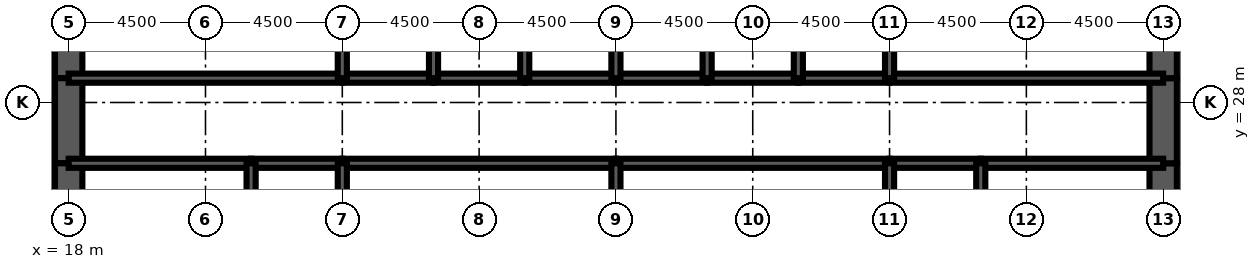
"""IFC4 building model, lengths in metres.
Left out: names, types, materials, properties, quantities, classifications, styles, units other than length and angle.
Written with IfcOpenShell. Run it as: python <this file> out.ifc"""

import sys

from ifc_helpers import new_model, si_unit, direction, frame, frame_2d, origin, place, context, subcontext, project, spatial, rectangle, extrude, element, fill, save


model = new_model("IFC4")
c1 = context("Model", 3, precision=1e-05, world=origin(), true_north=direction((0.0, 1.0)))
c2 = subcontext(c1, "Body", "Model", "MODEL_VIEW")
j1 = project(units=[si_unit("LENGTHUNIT", "METRE"), si_unit("PLANEANGLEUNIT", "RADIAN")], contexts=[c1])
p1 = place(None, origin())
s1 = spatial("IfcSite", under=j1, at=p1, CompositionType="ELEMENT")
p2 = place(p1, origin())
s2 = spatial("IfcBuilding", under=s1, at=p2, CompositionType="ELEMENT")
p3 = place(p2, frame((0.0, 0.0, 77.0)))
s3 = spatial("IfcBuildingStorey", under=s2, at=p3, CompositionType="ELEMENT", Elevation=77.0)
p4 = place(p3, frame((18.0, 32.0, 0.0), z_axis=(0.0, 0.0, 1.0), x_axis=(0.0, -1.0, 0.0)))
e1 = element("IfcWall", 1, at=p4, inside=s3, PredefinedType="SHEAR", context=c2, shape_type="SweptSolid", body=[
    extrude(rectangle(XDim=3.2, YDim=0.9, at=frame_2d((1.6, 0.0))), origin(), (0.0, 0.0, 1.0), 4.5),
])
p5 = place(p3, frame((18.0, 28.8, 0.0), z_axis=(0.0, 0.0, 1.0), x_axis=(0.0, -1.0, 0.0)))
e2 = element("IfcWall", 2, at=p5, inside=s3, PredefinedType="SHEAR", context=c2, shape_type="SweptSolid", body=[
    extrude(rectangle(XDim=2.8, YDim=0.9, at=frame_2d((1.4, 0.0))), origin(), (0.0, 0.0, 1.0), 4.5),
])
p6 = place(p5, frame((0.4, 0.0, 0.0)))
e3 = element("IfcOpeningElement", 3, at=p6, cuts=e2, PredefinedType="OPENING", context=c2, shape_type="SweptSolid", body=[
    extrude(rectangle(XDim=1.8, YDim=2.1, at=frame_2d((0.9, 1.05))), frame((0.0, 0.46, 0.0), z_axis=(0.0, -1.0, 0.0), x_axis=(1.0, 0.0, 0.0)), (0.0, 0.0, 1.0), 0.92),
])
for number, where, z_axis, x_axis in (
    (4, (18.0, 26.0, 0.0), (0.0, 0.0, 1.0), (0.0, -1.0, 0.0)),
    (5, (54.0, 22.0, 0.0), (0.0, 0.0, 1.0), (0.0, 1.0, 0.0)),
):
    element("IfcWall", number, at=place(p3, frame(where, z_axis=z_axis, x_axis=x_axis)), inside=s3, PredefinedType="SHEAR", context=c2, shape_type="SweptSolid", body=[
        extrude(rectangle(XDim=4.0, YDim=0.9, at=frame_2d((2.0, 0.0))), origin(), (0.0, 0.0, 1.0), 4.5),
    ])
p7 = place(p3, frame((54.0, 26.0, 0.0), z_axis=(0.0, 0.0, 1.0), x_axis=(0.0, 1.0, 0.0)))
e6 = element("IfcWall", 6, at=p7, inside=s3, PredefinedType="SHEAR", context=c2, shape_type="SweptSolid", body=[
    extrude(rectangle(XDim=2.8, YDim=0.9, at=frame_2d((1.4, 0.0))), origin(), (0.0, 0.0, 1.0), 4.5),
])
p8 = place(p7, frame((0.6, 0.0, 0.0)))
e7 = element("IfcOpeningElement", 7, at=p8, cuts=e6, PredefinedType="OPENING", context=c2, shape_type="SweptSolid", body=[
    extrude(rectangle(XDim=1.8, YDim=2.1, at=frame_2d((0.9, 1.05))), frame((0.0, 0.46, 0.0), z_axis=(0.0, -1.0, 0.0), x_axis=(1.0, 0.0, 0.0)), (0.0, 0.0, 1.0), 0.92),
])
p9 = place(p3, frame((54.0, 28.8, 0.0), z_axis=(0.0, 0.0, 1.0), x_axis=(0.0, 1.0, 0.0)))
e8 = element("IfcWall", 8, at=p9, inside=s3, PredefinedType="SHEAR", context=c2, shape_type="SweptSolid", body=[
    extrude(rectangle(XDim=3.2, YDim=0.9, at=frame_2d((1.6, 0.0))), origin(), (0.0, 0.0, 1.0), 4.5),
])
p10 = place(p3, frame((18.0, 28.8, 0.0), z_axis=(0.0, 0.0, 1.0), x_axis=(1.0, 0.0, 0.0)))
e9 = element("IfcWall", 9, at=p10, inside=s3, PredefinedType="SOLIDWALL", context=c2, shape_type="SweptSolid", body=[
    extrude(rectangle(XDim=9.0, YDim=0.3, at=frame_2d((4.5, 0.0))), origin(), (0.0, 0.0, 1.0), 4.5),
])
p11 = place(p10, frame((0.65, 0.0, 0.0)))
e10 = element("IfcOpeningElement", 10, at=p11, cuts=e9, PredefinedType="OPENING", context=c2, shape_type="SweptSolid", body=[
    extrude(rectangle(XDim=1.0, YDim=2.1, at=frame_2d((0.5, 1.05))), frame((0.0, 0.16, 0.0), z_axis=(0.0, -1.0, 0.0), x_axis=(1.0, 0.0, 0.0)), (0.0, 0.0, 1.0), 0.32),
])
p12 = place(p3, frame((27.0, 28.8, 0.0), z_axis=(0.0, 0.0, 1.0), x_axis=(1.0, 0.0, 0.0)))
e11 = element("IfcWall", 11, at=p12, inside=s3, PredefinedType="SOLIDWALL", context=c2, shape_type="SweptSolid", body=[
    extrude(rectangle(XDim=3.0, YDim=0.3, at=frame_2d((1.5, 0.0))), origin(), (0.0, 0.0, 1.0), 4.5),
])
p13 = place(p12, frame((0.95, 0.0, 0.0)))
e12 = element("IfcOpeningElement", 12, at=p13, cuts=e11, PredefinedType="OPENING", context=c2, shape_type="SweptSolid", body=[
    extrude(rectangle(XDim=1.1, YDim=2.2, at=frame_2d((0.55, 1.1))), frame((0.0, 0.16, 0.0), z_axis=(0.0, -1.0, 0.0), x_axis=(1.0, 0.0, 0.0)), (0.0, 0.0, 1.0), 0.32),
])
p14 = place(p3, frame((30.0, 28.8, 0.0), z_axis=(0.0, 0.0, 1.0), x_axis=(1.0, 0.0, 0.0)))
e13 = element("IfcWall", 13, at=p14, inside=s3, PredefinedType="SOLIDWALL", context=c2, shape_type="SweptSolid", body=[
    extrude(rectangle(XDim=3.0, YDim=0.3, at=frame_2d((1.5, 0.0))), origin(), (0.0, 0.0, 1.0), 4.5),
])
p15 = place(p14, frame((0.95, 0.0, 0.0)))
e14 = element("IfcOpeningElement", 14, at=p15, cuts=e13, PredefinedType="OPENING", context=c2, shape_type="SweptSolid", body=[
    extrude(rectangle(XDim=1.1, YDim=2.2, at=frame_2d((0.55, 1.1))), frame((0.0, 0.16, 0.0), z_axis=(0.0, -1.0, 0.0), x_axis=(1.0, 0.0, 0.0)), (0.0, 0.0, 1.0), 0.32),
])
p16 = place(p3, frame((33.0, 28.8, 0.0), z_axis=(0.0, 0.0, 1.0), x_axis=(1.0, 0.0, 0.0)))
e15 = element("IfcWall", 15, at=p16, inside=s3, PredefinedType="SOLIDWALL", context=c2, shape_type="SweptSolid", body=[
    extrude(rectangle(XDim=3.0, YDim=0.3, at=frame_2d((1.5, 0.0))), origin(), (0.0, 0.0, 1.0), 4.5),
])
p17 = place(p16, frame((0.95, 0.0, 0.0)))
e16 = element("IfcOpeningElement", 16, at=p17, cuts=e15, PredefinedType="OPENING", context=c2, shape_type="SweptSolid", body=[
    extrude(rectangle(XDim=1.1, YDim=2.2, at=frame_2d((0.55, 1.1))), frame((0.0, 0.16, 0.0), z_axis=(0.0, -1.0, 0.0), x_axis=(1.0, 0.0, 0.0)), (0.0, 0.0, 1.0), 0.32),
])
for number, where, z_axis, x_axis in (
    (17, (36.0, 28.8, 0.0), (0.0, 0.0, 1.0), (1.0, 0.0, 0.0)),
    (18, (39.0, 28.8, 0.0), (0.0, 0.0, 1.0), (1.0, 0.0, 0.0)),
):
    element("IfcWall", number, at=place(p3, frame(where, z_axis=z_axis, x_axis=x_axis)), inside=s3, PredefinedType="SOLIDWALL", context=c2, shape_type="SweptSolid", body=[
        extrude(rectangle(XDim=3.0, YDim=0.3, at=frame_2d((1.5, 0.0))), origin(), (0.0, 0.0, 1.0), 4.5),
    ])
p18 = place(p3, frame((42.0, 28.8, 0.0), z_axis=(0.0, 0.0, 1.0), x_axis=(1.0, 0.0, 0.0)))
e19 = element("IfcWall", 19, at=p18, inside=s3, PredefinedType="SOLIDWALL", context=c2, shape_type="SweptSolid", body=[
    extrude(rectangle(XDim=3.0, YDim=0.3, at=frame_2d((1.5, 0.0))), origin(), (0.0, 0.0, 1.0), 4.5),
])
p19 = place(p18, frame((0.95, 0.0, 0.0)))
e20 = element("IfcOpeningElement", 20, at=p19, cuts=e19, PredefinedType="OPENING", context=c2, shape_type="SweptSolid", body=[
    extrude(rectangle(XDim=1.1, YDim=2.2, at=frame_2d((0.55, 1.1))), frame((0.0, 0.16, 0.0), z_axis=(0.0, -1.0, 0.0), x_axis=(1.0, 0.0, 0.0)), (0.0, 0.0, 1.0), 0.32),
])
p20 = place(p3, frame((45.0, 28.8, 0.0), z_axis=(0.0, 0.0, 1.0), x_axis=(1.0, 0.0, 0.0)))
e21 = element("IfcWall", 21, at=p20, inside=s3, PredefinedType="SOLIDWALL", context=c2, shape_type="SweptSolid", body=[
    extrude(rectangle(XDim=9.0, YDim=0.3, at=frame_2d((4.5, 0.0))), origin(), (0.0, 0.0, 1.0), 4.5),
])
p21 = place(p20, frame((7.35, 0.0, 0.0)))
e22 = element("IfcOpeningElement", 22, at=p21, cuts=e21, PredefinedType="OPENING", context=c2, shape_type="SweptSolid", body=[
    extrude(rectangle(XDim=1.0, YDim=2.1, at=frame_2d((0.5, 1.05))), frame((0.0, 0.16, 0.0), z_axis=(0.0, -1.0, 0.0), x_axis=(1.0, 0.0, 0.0)), (0.0, 0.0, 1.0), 0.32),
])
p22 = place(p3, frame((18.0, 26.0, 0.0), z_axis=(0.0, 0.0, 1.0), x_axis=(1.0, 0.0, 0.0)))
e23 = element("IfcWall", 23, at=p22, inside=s3, PredefinedType="SOLIDWALL", context=c2, shape_type="SweptSolid", body=[
    extrude(rectangle(XDim=6.0, YDim=0.3, at=frame_2d((3.0, 0.0))), origin(), (0.0, 0.0, 1.0), 4.5),
])
p23 = place(p3, frame((24.0, 26.0, 0.0), z_axis=(0.0, 0.0, 1.0), x_axis=(1.0, 0.0, 0.0)))
e24 = element("IfcWall", 24, at=p23, inside=s3, PredefinedType="SOLIDWALL", context=c2, shape_type="SweptSolid", body=[
    extrude(rectangle(XDim=3.0, YDim=0.3, at=frame_2d((1.5, 0.0))), origin(), (0.0, 0.0, 1.0), 4.5),
])
for number, where, z_axis, x_axis in (
    (25, (27.0, 26.0, 0.0), (0.0, 0.0, 1.0), (1.0, 0.0, 0.0)),
    (26, (36.0, 26.0, 0.0), (0.0, 0.0, 1.0), (1.0, 0.0, 0.0)),
):
    element("IfcWall", number, at=place(p3, frame(where, z_axis=z_axis, x_axis=x_axis)), inside=s3, PredefinedType="SOLIDWALL", context=c2, shape_type="SweptSolid", body=[
        extrude(rectangle(XDim=9.0, YDim=0.3, at=frame_2d((4.5, 0.0))), origin(), (0.0, 0.0, 1.0), 4.5),
    ])
p24 = place(p3, frame((45.0, 26.0, 0.0), z_axis=(0.0, 0.0, 1.0), x_axis=(1.0, 0.0, 0.0)))
e27 = element("IfcWall", 27, at=p24, inside=s3, PredefinedType="SOLIDWALL", context=c2, shape_type="SweptSolid", body=[
    extrude(rectangle(XDim=3.0, YDim=0.3, at=frame_2d((1.5, 0.0))), origin(), (0.0, 0.0, 1.0), 4.5),
])
p25 = place(p3, frame((48.0, 26.0, 0.0), z_axis=(0.0, 0.0, 1.0), x_axis=(1.0, 0.0, 0.0)))
e28 = element("IfcWall", 28, at=p25, inside=s3, PredefinedType="SOLIDWALL", context=c2, shape_type="SweptSolid", body=[
    extrude(rectangle(XDim=6.0, YDim=0.3, at=frame_2d((3.0, 0.0))), origin(), (0.0, 0.0, 1.0), 4.5),
])
for number, where, z_axis, x_axis in (
    (29, (27.0, 28.8, 0.0), (0.0, 0.0, 1.0), (0.0, 1.0, 0.0)),
    (30, (30.0, 28.8, 0.0), (0.0, 0.0, 1.0), (0.0, 1.0, 0.0)),
    (31, (33.0, 28.8, 0.0), (0.0, 0.0, 1.0), (0.0, 1.0, 0.0)),
    (32, (36.0, 28.8, 0.0), (0.0, 0.0, 1.0), (0.0, 1.0, 0.0)),
    (33, (39.0, 28.8, 0.0), (0.0, 0.0, 1.0), (0.0, 1.0, 0.0)),
    (34, (42.0, 28.8, 0.0), (0.0, 0.0, 1.0), (0.0, 1.0, 0.0)),
    (35, (45.0, 28.8, 0.0), (0.0, 0.0, 1.0), (0.0, 1.0, 0.0)),
):
    element("IfcWall", number, at=place(p3, frame(where, z_axis=z_axis, x_axis=x_axis)), inside=s3, PredefinedType="SOLIDWALL", context=c2, shape_type="SweptSolid", body=[
        extrude(rectangle(XDim=3.2, YDim=0.3, at=frame_2d((1.6, 0.0))), origin(), (0.0, 0.0, 1.0), 4.5),
    ])
for number, where, z_axis, x_axis in (
    (36, (24.0, 22.0, 0.0), (0.0, 0.0, 1.0), (0.0, 1.0, 0.0)),
    (37, (27.0, 22.0, 0.0), (0.0, 0.0, 1.0), (0.0, 1.0, 0.0)),
    (38, (36.0, 22.0, 0.0), (0.0, 0.0, 1.0), (0.0, 1.0, 0.0)),
    (39, (45.0, 22.0, 0.0), (0.0, 0.0, 1.0), (0.0, 1.0, 0.0)),
    (40, (48.0, 22.0, 0.0), (0.0, 0.0, 1.0), (0.0, 1.0, 0.0)),
):
    element("IfcWall", number, at=place(p3, frame(where, z_axis=z_axis, x_axis=x_axis)), inside=s3, PredefinedType="SOLIDWALL", context=c2, shape_type="SweptSolid", body=[
        extrude(rectangle(XDim=4.0, YDim=0.3, at=frame_2d((2.0, 0.0))), origin(), (0.0, 0.0, 1.0), 4.5),
    ])
p26 = place(p3, frame((38.0, 22.15, 0.0), z_axis=(0.0, 0.0, 1.0), x_axis=(0.0, 1.0, 0.0)))
e41 = element("IfcWall", 41, at=p26, inside=s3, PredefinedType="PARTITIONING", context=c2, shape_type="SweptSolid", body=[
    extrude(rectangle(XDim=3.7, YDim=0.15, at=frame_2d((1.85, 0.0))), origin(), (0.0, 0.0, 1.0), 3.0),
])
p27 = place(p26, frame((2.2, 0.0, 0.0)))
e42 = element("IfcOpeningElement", 42, at=p27, cuts=e41, PredefinedType="OPENING", context=c2, shape_type="SweptSolid", body=[
    extrude(rectangle(XDim=1.0, YDim=2.1, at=frame_2d((0.5, 1.05))), frame((0.0, 0.085, 0.0), z_axis=(0.0, -1.0, 0.0), x_axis=(1.0, 0.0, 0.0)), (0.0, 0.0, 1.0), 0.17),
])
p28 = place(p3, frame((51.975, 22.15, 0.0), z_axis=(0.0, 0.0, 1.0), x_axis=(0.0, 1.0, 0.0)))
e43 = element("IfcWall", 43, at=p28, inside=s3, PredefinedType="PARTITIONING", context=c2, shape_type="SweptSolid", body=[
    extrude(rectangle(XDim=3.7, YDim=0.15, at=frame_2d((1.85, 0.0))), origin(), (0.0, 0.0, 1.0), 3.0),
])
p29 = place(p27, origin())
e44 = element("IfcDoor", 44, at=p29, inside=s3, OperationType="SINGLE_SWING_RIGHT", PredefinedType="DOOR", context=c2, shape_type="SweptSolid", body=[
    extrude(rectangle(XDim=1.0, YDim=2.1, at=frame_2d((0.5, 1.05))), frame((0.0, 0.025, 0.0), z_axis=(0.0, -1.0, 0.0), x_axis=(1.0, 0.0, 0.0)), (0.0, 0.0, 1.0), 0.05),
])
fill(e42, e44)
p30 = place(p19, origin())
e45 = element("IfcDoor", 45, at=p30, inside=s3, OperationType="DOUBLE_DOOR_SLIDING", PredefinedType="USERDEFINED", context=c2, shape_type="SweptSolid", body=[
    extrude(rectangle(XDim=1.1, YDim=2.2, at=frame_2d((0.55, 1.1))), frame((0.0, 0.025, 0.0), z_axis=(0.0, -1.0, 0.0), x_axis=(1.0, 0.0, 0.0)), (0.0, 0.0, 1.0), 0.05),
])
fill(e20, e45)
p31 = place(p13, origin())
e46 = element("IfcDoor", 46, at=p31, inside=s3, OperationType="DOUBLE_DOOR_SLIDING", PredefinedType="USERDEFINED", context=c2, shape_type="SweptSolid", body=[
    extrude(rectangle(XDim=1.1, YDim=2.2, at=frame_2d((0.55, 1.1))), frame((0.0, 0.025, 0.0), z_axis=(0.0, -1.0, 0.0), x_axis=(1.0, 0.0, 0.0)), (0.0, 0.0, 1.0), 0.05),
])
fill(e12, e46)
p32 = place(p15, origin())
e47 = element("IfcDoor", 47, at=p32, inside=s3, OperationType="DOUBLE_DOOR_SLIDING", PredefinedType="USERDEFINED", context=c2, shape_type="SweptSolid", body=[
    extrude(rectangle(XDim=1.1, YDim=2.2, at=frame_2d((0.55, 1.1))), frame((0.0, 0.025, 0.0), z_axis=(0.0, -1.0, 0.0), x_axis=(1.0, 0.0, 0.0)), (0.0, 0.0, 1.0), 0.05),
])
fill(e14, e47)
p33 = place(p17, origin())
e48 = element("IfcDoor", 48, at=p33, inside=s3, OperationType="DOUBLE_DOOR_SLIDING", PredefinedType="USERDEFINED", context=c2, shape_type="SweptSolid", body=[
    extrude(rectangle(XDim=1.1, YDim=2.2, at=frame_2d((0.55, 1.1))), frame((0.0, 0.025, 0.0), z_axis=(0.0, -1.0, 0.0), x_axis=(1.0, 0.0, 0.0)), (0.0, 0.0, 1.0), 0.05),
])
fill(e16, e48)
p34 = place(p11, origin())
e49 = element("IfcDoor", 49, at=p34, inside=s3, OperationType="SINGLE_SWING_LEFT", PredefinedType="DOOR", context=c2, shape_type="SweptSolid", body=[
    extrude(rectangle(XDim=1.0, YDim=2.1, at=frame_2d((0.5, 1.05))), frame((0.0, 0.025, 0.0), z_axis=(0.0, -1.0, 0.0), x_axis=(1.0, 0.0, 0.0)), (0.0, 0.0, 1.0), 0.05),
])
fill(e10, e49)
p35 = place(p21, origin())
e50 = element("IfcDoor", 50, at=p35, inside=s3, OperationType="SINGLE_SWING_RIGHT", PredefinedType="DOOR", context=c2, shape_type="SweptSolid", body=[
    extrude(rectangle(XDim=1.0, YDim=2.1, at=frame_2d((0.5, 1.05))), frame((0.0, 0.025, 0.0), z_axis=(0.0, -1.0, 0.0), x_axis=(1.0, 0.0, 0.0)), (0.0, 0.0, 1.0), 0.05),
])
fill(e22, e50)
p36 = place(p6, origin())
e51 = element("IfcDoor", 51, at=p36, inside=s3, OperationType="SINGLE_SWING_LEFT", PredefinedType="DOOR", context=c2, shape_type="SweptSolid", body=[
    extrude(rectangle(XDim=1.8, YDim=2.1, at=frame_2d((0.9, 1.05))), frame((0.0, 0.45, 0.0), z_axis=(0.0, -1.0, 0.0), x_axis=(1.0, 0.0, 0.0)), (0.0, 0.0, 1.0), 0.899),
])
fill(e3, e51)
p37 = place(p8, origin())
e52 = element("IfcDoor", 52, at=p37, inside=s3, OperationType="SINGLE_SWING_LEFT", PredefinedType="DOOR", context=c2, shape_type="SweptSolid", body=[
    extrude(rectangle(XDim=1.8, YDim=2.1, at=frame_2d((0.9, 1.05))), frame((0.0, 0.45, 0.0), z_axis=(0.0, -1.0, 0.0), x_axis=(1.0, 0.0, 0.0)), (0.0, 0.0, 1.0), 0.899),
])
fill(e7, e52)
save(model, sys.argv[1])
